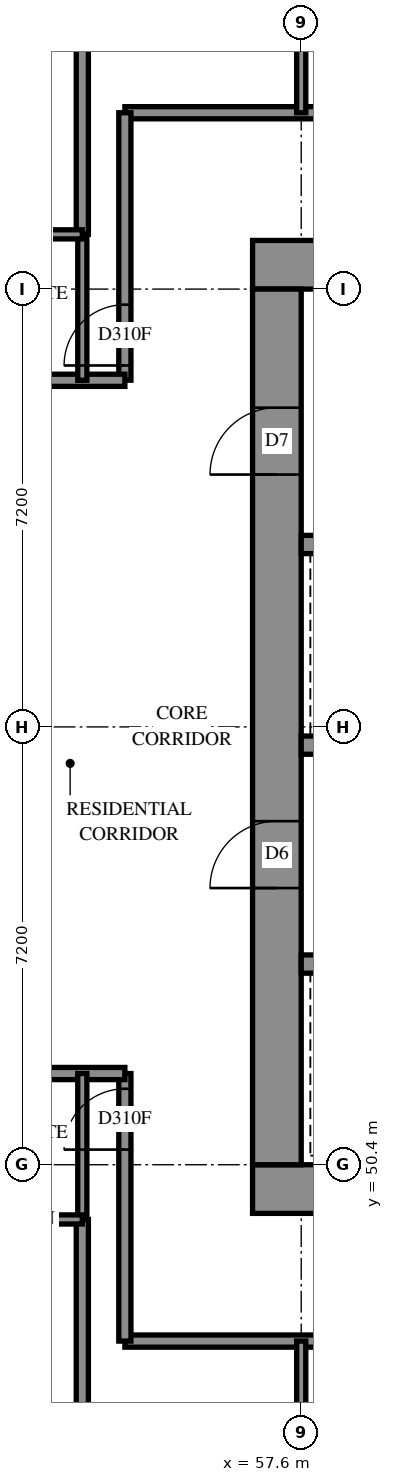
"""IFC4 building model, lengths in metres.
Left out: names, types, materials, properties, quantities, classifications, styles, units other than length and angle.
Written with IfcOpenShell. Run it as: python <this file> out.ifc"""

import sys

from ifc_helpers import new_model, si_unit, direction, frame, frame_2d, origin, place, context, subcontext, project, spatial, rectangle, extrude, element, fill, save


model = new_model("IFC4")
c1 = context("Model", 3, precision=1e-05, world=origin(), true_north=direction((0.0, 1.0)))
c2 = subcontext(c1, "Body", "Model", "MODEL_VIEW")
j1 = project(units=[si_unit("LENGTHUNIT", "METRE"), si_unit("PLANEANGLEUNIT", "RADIAN")], contexts=[c1])
p1 = place(None, origin())
s1 = spatial("IfcSite", under=j1, at=p1, CompositionType="ELEMENT")
p2 = place(p1, origin())
s2 = spatial("IfcBuilding", under=s1, at=p2, CompositionType="ELEMENT")
p3 = place(p2, frame((0.0, 0.0, 98.2)))
s3 = spatial("IfcBuildingStorey", under=s2, at=p3, CompositionType="ELEMENT", Elevation=98.2)
p4 = place(p3, frame((56.8, 50.0, -0.3), z_axis=(0.0, 0.0, 1.0), x_axis=(1.0, 0.0, 0.0)))
e1 = element("IfcWall", 1, at=p4, inside=s3, PredefinedType="SHEAR", context=c2, shape_type="SweptSolid", body=[
    extrude(rectangle(XDim=16.0, YDim=0.8, at=frame_2d((8.0, 0.0))), origin(), (0.0, 0.0, 1.0), 2.7),
])
p5 = place(p3, frame((56.8, 65.2, -0.3), z_axis=(0.0, 0.0, 1.0), x_axis=(1.0, 0.0, 0.0)))
e2 = element("IfcWall", 2, at=p5, inside=s3, PredefinedType="SHEAR", context=c2, shape_type="SweptSolid", body=[
    extrude(rectangle(XDim=16.0, YDim=0.8, at=frame_2d((8.0, 0.0))), origin(), (0.0, 0.0, 1.0), 2.7),
])
p6 = place(p5, frame((10.8, 0.0, 0.3)))
e3 = element("IfcOpeningElement", 3, at=p6, cuts=e2, PredefinedType="OPENING", context=c2, shape_type="SweptSolid", body=[
    extrude(rectangle(XDim=0.8, YDim=2.1, at=frame_2d((0.4, 1.05))), frame((0.0, 0.41, 0.0), z_axis=(0.0, -1.0, 0.0), x_axis=(1.0, 0.0, 0.0)), (0.0, 0.0, 1.0), 0.82),
])
p7 = place(p3, frame((57.2, 50.4, -0.3), z_axis=(0.0, 0.0, 1.0), x_axis=(0.0, 1.0, 0.0)))
e4 = element("IfcWall", 4, at=p7, inside=s3, PredefinedType="SHEAR", context=c2, shape_type="SweptSolid", body=[
    extrude(rectangle(XDim=14.4, YDim=0.8, at=frame_2d((7.2, 0.0))), origin(), (0.0, 0.0, 1.0), 2.7),
])
p8 = place(p7, frame((4.55, 0.0, 0.3)))
e5 = element("IfcOpeningElement", 5, at=p8, cuts=e4, PredefinedType="OPENING", context=c2, shape_type="SweptSolid", body=[
    extrude(rectangle(XDim=1.1, YDim=2.1, at=frame_2d((0.55, 1.05))), frame((0.0, 0.41, 0.0), z_axis=(0.0, -1.0, 0.0), x_axis=(1.0, 0.0, 0.0)), (0.0, 0.0, 1.0), 0.82),
])
p9 = place(p7, frame((11.35, 0.0, 0.3)))
e6 = element("IfcOpeningElement", 6, at=p9, cuts=e4, PredefinedType="OPENING", context=c2, shape_type="SweptSolid", body=[
    extrude(rectangle(XDim=1.1, YDim=2.1, at=frame_2d((0.55, 1.05))), frame((0.0, 0.41, 0.0), z_axis=(0.0, -1.0, 0.0), x_axis=(1.0, 0.0, 0.0)), (0.0, 0.0, 1.0), 0.82),
])
p10 = place(p3, frame((57.6, 53.7, 0.0), z_axis=(0.0, 0.0, 1.0), x_axis=(1.0, 0.0, 0.0)))
e7 = element("IfcWall", 7, at=p10, inside=s3, PredefinedType="SOLIDWALL", context=c2, shape_type="SweptSolid", body=[
    extrude(rectangle(XDim=14.4, YDim=0.3, at=frame_2d((7.2, 0.0))), origin(), (0.0, 0.0, 1.0), 3.1),
])
p11 = place(p10, frame((1.25, 0.0, 0.0)))
e8 = element("IfcOpeningElement", 8, at=p11, cuts=e7, PredefinedType="OPENING", context=c2, shape_type="SweptSolid", body=[
    extrude(rectangle(XDim=1.1, YDim=2.1, at=frame_2d((0.55, 1.05))), frame((0.0, 0.16, 0.0), z_axis=(0.0, -1.0, 0.0), x_axis=(1.0, 0.0, 0.0)), (0.0, 0.0, 1.0), 0.32),
])
p12 = place(p10, frame((4.85, 0.0, 0.0)))
e9 = element("IfcOpeningElement", 9, at=p12, cuts=e7, PredefinedType="OPENING", context=c2, shape_type="SweptSolid", body=[
    extrude(rectangle(XDim=1.1, YDim=2.1, at=frame_2d((0.55, 1.05))), frame((0.0, 0.16, 0.0), z_axis=(0.0, -1.0, 0.0), x_axis=(1.0, 0.0, 0.0)), (0.0, 0.0, 1.0), 0.32),
])
p13 = place(p10, frame((8.45, 0.0, 0.0)))
e10 = element("IfcOpeningElement", 10, at=p13, cuts=e7, PredefinedType="OPENING", context=c2, shape_type="SweptSolid", body=[
    extrude(rectangle(XDim=1.1, YDim=2.1, at=frame_2d((0.55, 1.05))), frame((0.0, 0.16, 0.0), z_axis=(0.0, -1.0, 0.0), x_axis=(1.0, 0.0, 0.0)), (0.0, 0.0, 1.0), 0.32),
])
p14 = place(p10, frame((12.05, 0.0, 0.0)))
e11 = element("IfcOpeningElement", 11, at=p14, cuts=e7, PredefinedType="OPENING", context=c2, shape_type="SweptSolid", body=[
    extrude(rectangle(XDim=1.1, YDim=2.1, at=frame_2d((0.55, 1.05))), frame((0.0, 0.16, 0.0), z_axis=(0.0, -1.0, 0.0), x_axis=(1.0, 0.0, 0.0)), (0.0, 0.0, 1.0), 0.32),
])
p15 = place(p3, frame((57.6, 57.3, 0.0), z_axis=(0.0, 0.0, 1.0), x_axis=(1.0, 0.0, 0.0)))
e12 = element("IfcWall", 12, at=p15, inside=s3, PredefinedType="SOLIDWALL", context=c2, shape_type="SweptSolid", body=[
    extrude(rectangle(XDim=14.4, YDim=0.3, at=frame_2d((7.2, 0.0))), origin(), (0.0, 0.0, 1.0), 3.1),
])
p16 = place(p15, frame((12.05, 0.0, 0.0)))
e13 = element("IfcOpeningElement", 13, at=p16, cuts=e12, PredefinedType="OPENING", context=c2, shape_type="SweptSolid", body=[
    extrude(rectangle(XDim=1.1, YDim=2.1, at=frame_2d((0.55, 1.05))), frame((0.0, 0.16, 0.0), z_axis=(0.0, -1.0, 0.0), x_axis=(1.0, 0.0, 0.0)), (0.0, 0.0, 1.0), 0.32),
])
p17 = place(p3, frame((57.6, 60.6, 0.0), z_axis=(0.0, 0.0, 1.0), x_axis=(1.0, 0.0, 0.0)))
e14 = element("IfcWall", 14, at=p17, inside=s3, PredefinedType="SOLIDWALL", context=c2, shape_type="SweptSolid", body=[
    extrude(rectangle(XDim=7.2, YDim=0.3, at=frame_2d((3.6, 0.0))), origin(), (0.0, 0.0, 1.0), 3.1),
])
p18 = place(p3, frame((54.7, 67.7, 0.0), z_axis=(0.0, 0.0, 1.0), x_axis=(1.0, 0.0, 0.0)))
e15 = element("IfcWall", 15, at=p18, inside=s3, PredefinedType="PARTITIONING", context=c2, shape_type="SweptSolid", body=[
    extrude(rectangle(XDim=20.2, YDim=0.2, at=frame_2d((10.1, 0.0))), origin(), (0.0, 0.0, 1.0), 3.1),
])
p19 = place(p18, frame((5.25, 0.0, 0.0)))
e16 = element("IfcOpeningElement", 16, at=p19, cuts=e15, PredefinedType="OPENING", context=c2, shape_type="SweptSolid", body=[
    extrude(rectangle(XDim=0.9, YDim=2.1, at=frame_2d((0.45, 1.05))), frame((0.0, 0.11, 0.0), z_axis=(0.0, -1.0, 0.0), x_axis=(1.0, 0.0, 0.0)), (0.0, 0.0, 1.0), 0.22),
])
p20 = place(p18, frame((6.9, 0.0, 0.0)))
e17 = element("IfcOpeningElement", 17, at=p20, cuts=e15, PredefinedType="OPENING", context=c2, shape_type="SweptSolid", body=[
    extrude(rectangle(XDim=0.9, YDim=2.1, at=frame_2d((0.45, 1.05))), frame((0.0, 0.11, 0.0), z_axis=(0.0, -1.0, 0.0), x_axis=(1.0, 0.0, 0.0)), (0.0, 0.0, 1.0), 0.22),
])
p21 = place(p18, frame((12.45, 0.0, 0.0)))
e18 = element("IfcOpeningElement", 18, at=p21, cuts=e15, PredefinedType="OPENING", context=c2, shape_type="SweptSolid", body=[
    extrude(rectangle(XDim=0.9, YDim=2.1, at=frame_2d((0.45, 1.05))), frame((0.0, 0.11, 0.0), z_axis=(0.0, -1.0, 0.0), x_axis=(1.0, 0.0, 0.0)), (0.0, 0.0, 1.0), 0.22),
])
p22 = place(p18, frame((14.1, 0.0, 0.0)))
e19 = element("IfcOpeningElement", 19, at=p22, cuts=e15, PredefinedType="OPENING", context=c2, shape_type="SweptSolid", body=[
    extrude(rectangle(XDim=0.9, YDim=2.1, at=frame_2d((0.45, 1.05))), frame((0.0, 0.11, 0.0), z_axis=(0.0, -1.0, 0.0), x_axis=(1.0, 0.0, 0.0)), (0.0, 0.0, 1.0), 0.22),
])
p23 = place(p3, frame((54.7, 47.5, 0.0), z_axis=(0.0, 0.0, 1.0), x_axis=(1.0, 0.0, 0.0)))
e20 = element("IfcWall", 20, at=p23, inside=s3, PredefinedType="PARTITIONING", context=c2, shape_type="SweptSolid", body=[
    extrude(rectangle(XDim=19.442, YDim=0.2, at=frame_2d((9.721, 0.0))), origin(), (0.0, 0.0, 1.0), 3.1),
])
p24 = place(p23, frame((5.2, 0.0, 0.0)))
e21 = element("IfcOpeningElement", 21, at=p24, cuts=e20, PredefinedType="OPENING", context=c2, shape_type="SweptSolid", body=[
    extrude(rectangle(XDim=0.9, YDim=2.1, at=frame_2d((0.45, 1.05))), frame((0.0, 0.11, 0.0), z_axis=(0.0, -1.0, 0.0), x_axis=(1.0, 0.0, 0.0)), (0.0, 0.0, 1.0), 0.22),
])
p25 = place(p23, frame((6.9, 0.0, 0.0)))
e22 = element("IfcOpeningElement", 22, at=p25, cuts=e20, PredefinedType="OPENING", context=c2, shape_type="SweptSolid", body=[
    extrude(rectangle(XDim=0.9, YDim=2.1, at=frame_2d((0.45, 1.05))), frame((0.0, 0.11, 0.0), z_axis=(0.0, -1.0, 0.0), x_axis=(1.0, 0.0, 0.0)), (0.0, 0.0, 1.0), 0.22),
])
p26 = place(p23, frame((13.963, 0.0, 0.0)))
e23 = element("IfcOpeningElement", 23, at=p26, cuts=e20, PredefinedType="OPENING", context=c2, shape_type="SweptSolid", body=[
    extrude(rectangle(XDim=1.0, YDim=2.1, at=frame_2d((0.5, 1.05))), frame((0.0, 0.11, 0.0), z_axis=(0.0, -1.0, 0.0), x_axis=(1.0, 0.0, 0.0)), (0.0, 0.0, 1.0), 0.22),
])
p27 = place(p3, frame((54.0, 42.372, 0.0), z_axis=(0.0, 0.0, 1.0), x_axis=(0.0, 1.0, 0.0)))
e24 = element("IfcWall", 24, at=p27, inside=s3, PredefinedType="PARTITIONING", context=c2, shape_type="SweptSolid", body=[
    extrude(rectangle(XDim=7.128, YDim=0.2, at=frame_2d((3.564, 0.0))), origin(), (0.0, 0.0, 1.0), 3.1),
])
p28 = place(p3, frame((54.0, 65.7, 0.0), z_axis=(0.0, 0.0, 1.0), x_axis=(0.0, 1.0, 0.0)))
e25 = element("IfcWall", 25, at=p28, inside=s3, PredefinedType="PARTITIONING", context=c2, shape_type="SweptSolid", body=[
    extrude(rectangle(XDim=7.001, YDim=0.2, at=frame_2d((3.5, 0.0))), origin(), (0.0, 0.0, 1.0), 3.1),
])
p29 = place(p3, frame((54.7, 47.5, 0.0), z_axis=(0.0, 0.0, 1.0), x_axis=(0.0, 1.0, 0.0)))
e26 = element("IfcWall", 26, at=p29, inside=s3, PredefinedType="PARTITIONING", context=c2, shape_type="SweptSolid", body=[
    extrude(rectangle(XDim=4.4, YDim=0.2, at=frame_2d((2.2, 0.0))), origin(), (0.0, 0.0, 1.0), 3.1),
])
p30 = place(p29, frame((3.149, 0.0, 0.0)))
e27 = element("IfcOpeningElement", 27, at=p30, cuts=e26, PredefinedType="OPENING", context=c2, shape_type="SweptSolid", body=[
    extrude(rectangle(XDim=1.0, YDim=2.1, at=frame_2d((0.5, 1.05))), frame((0.0, 0.11, 0.0), z_axis=(0.0, -1.0, 0.0), x_axis=(1.0, 0.0, 0.0)), (0.0, 0.0, 1.0), 0.22),
])
p31 = place(p3, frame((54.7, 63.302, 0.0), z_axis=(0.0, 0.0, 1.0), x_axis=(0.0, 1.0, 0.0)))
e28 = element("IfcWall", 28, at=p31, inside=s3, PredefinedType="PARTITIONING", context=c2, shape_type="SweptSolid", body=[
    extrude(rectangle(XDim=4.398, YDim=0.2, at=frame_2d((2.199, 0.0))), origin(), (0.0, 0.0, 1.0), 3.1),
])
p32 = place(p31, frame((0.242, 0.0, 0.0)))
e29 = element("IfcOpeningElement", 29, at=p32, cuts=e28, PredefinedType="OPENING", context=c2, shape_type="SweptSolid", body=[
    extrude(rectangle(XDim=1.0, YDim=2.1, at=frame_2d((0.5, 1.05))), frame((0.0, 0.11, 0.0), z_axis=(0.0, -1.0, 0.0), x_axis=(1.0, 0.0, 0.0)), (0.0, 0.0, 1.0), 0.22),
])
p33 = place(p3, frame((50.4, 51.9, 0.0), z_axis=(0.0, 0.0, 1.0), x_axis=(1.0, 0.0, 0.0)))
e30 = element("IfcWall", 30, at=p33, inside=s3, PredefinedType="PARTITIONING", context=c2, shape_type="SweptSolid", body=[
    extrude(rectangle(XDim=4.3, YDim=0.2, at=frame_2d((2.15, 0.0))), origin(), (0.0, 0.0, 1.0), 3.1),
])
p34 = place(p33, frame((0.552, 0.0, 0.0)))
e31 = element("IfcOpeningElement", 31, at=p34, cuts=e30, PredefinedType="OPENING", context=c2, shape_type="SweptSolid", body=[
    extrude(rectangle(XDim=0.9, YDim=2.1, at=frame_2d((0.45, 1.05))), frame((0.0, 0.11, 0.0), z_axis=(0.0, -1.0, 0.0), x_axis=(1.0, 0.0, 0.0)), (0.0, 0.0, 1.0), 0.22),
])
p35 = place(p3, frame((50.4, 63.3, 0.0), z_axis=(0.0, 0.0, 1.0), x_axis=(1.0, 0.0, 0.0)))
e32 = element("IfcWall", 32, at=p35, inside=s3, PredefinedType="PARTITIONING", context=c2, shape_type="SweptSolid", body=[
    extrude(rectangle(XDim=4.3, YDim=0.2, at=frame_2d((2.15, 0.0))), origin(), (0.0, 0.0, 1.0), 3.1),
])
p36 = place(p35, frame((0.552, 0.0, 0.0)))
e33 = element("IfcOpeningElement", 33, at=p36, cuts=e32, PredefinedType="OPENING", context=c2, shape_type="SweptSolid", body=[
    extrude(rectangle(XDim=0.9, YDim=2.1, at=frame_2d((0.45, 1.05))), frame((0.0, 0.11, 0.0), z_axis=(0.0, -1.0, 0.0), x_axis=(1.0, 0.0, 0.0)), (0.0, 0.0, 1.0), 0.22),
])
for number, where, z_axis, x_axis in (
    (34, (54.0, 63.3, 0.0), (0.0, 0.0, 1.0), (0.0, 1.0, 0.0)),
    (35, (54.0, 49.5, 0.0), (0.0, 0.0, 1.0), (0.0, 1.0, 0.0)),
    (36, (57.6, 45.1, 0.0), (0.0, 0.0, 1.0), (0.0, 1.0, 0.0)),
    (37, (57.6, 67.7, 0.0), (0.0, 0.0, 1.0), (0.0, 1.0, 0.0)),
):
    element("IfcWall", number, at=place(p3, frame(where, z_axis=z_axis, x_axis=x_axis)), inside=s3, PredefinedType="PARTITIONING", context=c2, shape_type="SweptSolid", body=[
        extrude(rectangle(XDim=2.4, YDim=0.15, at=frame_2d((1.2, 0.0))), origin(), (0.0, 0.0, 1.0), 3.1),
    ])
p37 = place(p3, frame((52.1, 49.5, 0.0), z_axis=(0.0, 0.0, 1.0), x_axis=(1.0, 0.0, 0.0)))
e38 = element("IfcWall", 38, at=p37, inside=s3, PredefinedType="PARTITIONING", context=c2, shape_type="SweptSolid", body=[
    extrude(rectangle(XDim=1.9, YDim=0.15, at=frame_2d((0.95, 0.0))), origin(), (0.0, 0.0, 1.0), 3.1),
])
p38 = place(p37, frame((0.598, 0.0, 0.0)))
e39 = element("IfcOpeningElement", 39, at=p38, cuts=e38, PredefinedType="OPENING", context=c2, shape_type="SweptSolid", body=[
    extrude(rectangle(XDim=0.8, YDim=2.1, at=frame_2d((0.4, 1.05))), frame((0.0, 0.085, 0.0), z_axis=(0.0, -1.0, 0.0), x_axis=(1.0, 0.0, 0.0)), (0.0, 0.0, 1.0), 0.17),
])
p39 = place(p3, frame((52.1, 65.7, 0.0), z_axis=(0.0, 0.0, 1.0), x_axis=(1.0, 0.0, 0.0)))
e40 = element("IfcWall", 40, at=p39, inside=s3, PredefinedType="PARTITIONING", context=c2, shape_type="SweptSolid", body=[
    extrude(rectangle(XDim=1.9, YDim=0.15, at=frame_2d((0.95, 0.0))), origin(), (0.0, 0.0, 1.0), 3.1),
])
p40 = place(p39, frame((0.493, 0.0, 0.0)))
e41 = element("IfcOpeningElement", 41, at=p40, cuts=e40, PredefinedType="OPENING", context=c2, shape_type="SweptSolid", body=[
    extrude(rectangle(XDim=0.8, YDim=2.1, at=frame_2d((0.4, 1.05))), frame((0.0, 0.085, 0.0), z_axis=(0.0, -1.0, 0.0), x_axis=(1.0, 0.0, 0.0)), (0.0, 0.0, 1.0), 0.17),
])
p41 = place(p8, origin())
e42 = element("IfcDoor", 42, at=p41, inside=s3, OperationType="DOUBLE_DOOR_SINGLE_SWING", PredefinedType="DOOR", context=c2, shape_type="SweptSolid", body=[
    extrude(rectangle(XDim=1.1, YDim=2.1, at=frame_2d((0.55, 1.05))), frame((0.0, 0.025, 0.0), z_axis=(0.0, -1.0, 0.0), x_axis=(1.0, 0.0, 0.0)), (0.0, 0.0, 1.0), 0.05),
])
fill(e5, e42)
p42 = place(p9, origin())
e43 = element("IfcDoor", 43, at=p42, inside=s3, OperationType="SINGLE_SWING_LEFT", PredefinedType="DOOR", context=c2, shape_type="SweptSolid", body=[
    extrude(rectangle(XDim=1.1, YDim=2.1, at=frame_2d((0.55, 1.05))), frame((0.0, 0.025, 0.0), z_axis=(0.0, -1.0, 0.0), x_axis=(1.0, 0.0, 0.0)), (0.0, 0.0, 1.0), 0.05),
])
fill(e6, e43)
p43 = place(p32, origin())
e44 = element("IfcDoor", 44, at=p43, inside=s3, OperationType="SINGLE_SWING_LEFT", PredefinedType="DOOR", context=c2, shape_type="SweptSolid", body=[
    extrude(rectangle(XDim=1.0, YDim=2.1, at=frame_2d((0.5, 1.05))), frame((0.0, 0.025, 0.0), z_axis=(0.0, -1.0, 0.0), x_axis=(1.0, 0.0, 0.0)), (0.0, 0.0, 1.0), 0.05),
])
fill(e29, e44)
p44 = place(p30, origin())
e45 = element("IfcDoor", 45, at=p44, inside=s3, OperationType="SINGLE_SWING_RIGHT", PredefinedType="DOOR", context=c2, shape_type="SweptSolid", body=[
    extrude(rectangle(XDim=1.0, YDim=2.1, at=frame_2d((0.5, 1.05))), frame((0.0, 0.025, 0.0), z_axis=(0.0, -1.0, 0.0), x_axis=(1.0, 0.0, 0.0)), (0.0, 0.0, 1.0), 0.05),
])
fill(e27, e45)
save(model, sys.argv[1])
